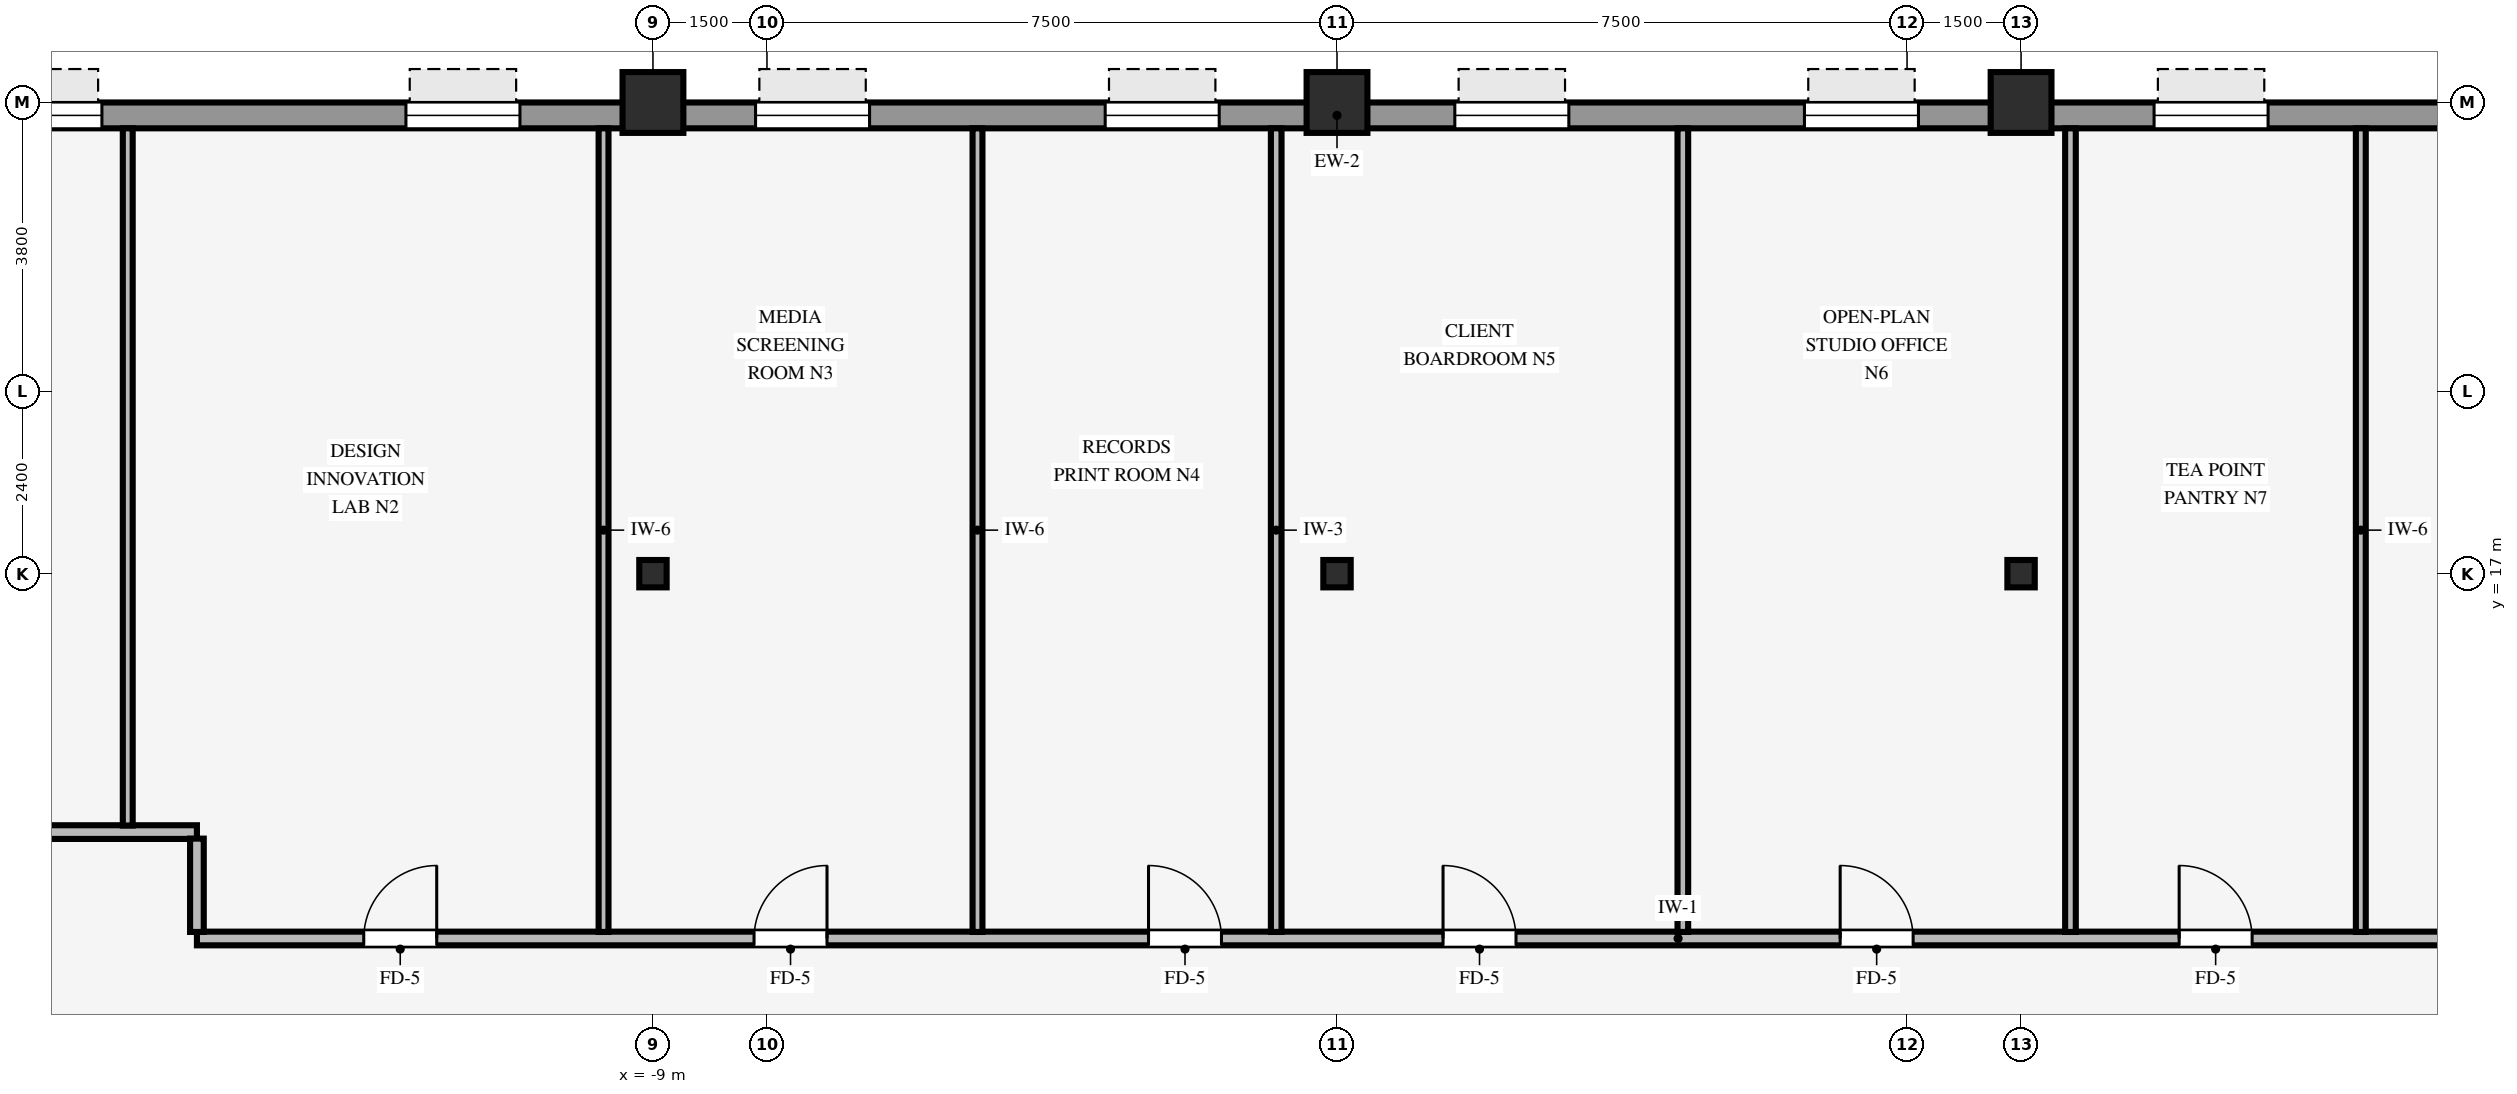
"""IFC4 building model, lengths in metres.
Left out: names, types, materials, properties, quantities, classifications, styles, units other than length and angle.
Written with IfcOpenShell. Run it as: python <this file> out.ifc"""

import sys

from ifc_helpers import new_model, si_unit, direction, frame, frame_2d, origin, origin_2d, place, context, subcontext, project, spatial, rectangle, hollow_rectangle, i_section, extrude, source, transform, mapped, element, fill, save


model = new_model("IFC4")
c1 = context("Model", 3, precision=1e-05, world=origin(), true_north=direction((0.0, 1.0)))
c2 = subcontext(c1, "Body", "Model", "MODEL_VIEW")
j1 = project(units=[si_unit("LENGTHUNIT", "METRE"), si_unit("PLANEANGLEUNIT", "RADIAN")], contexts=[c1])
p1 = place(None, origin())
s1 = spatial("IfcSite", under=j1, at=p1, CompositionType="ELEMENT")
p2 = place(p1, origin())
s2 = spatial("IfcBuilding", under=s1, at=p2, CompositionType="ELEMENT")
p3 = place(p2, frame((0.0, 0.0, 64.1)))
s3 = spatial("IfcBuildingStorey", under=s2, at=p3, CompositionType="ELEMENT", Elevation=64.1)
for number, where, z_axis, x_axis in (
    (1, (-9.0, 23.2, 0.0), (0.0, 0.0, 1.0), (1.0, 0.0, 0.0)),
    (2, (0.0, 23.2, 0.0), (0.0, 0.0, 1.0), (1.0, 0.0, 0.0)),
    (3, (9.0, 23.2, 0.0), (0.0, 0.0, 1.0), (1.0, 0.0, 0.0)),
):
    element("IfcColumn", number, at=place(p3, frame(where, z_axis=z_axis, x_axis=x_axis)), inside=s3, PredefinedType="COLUMN", context=c2, shape_type="SweptSolid", body=[
        extrude(hollow_rectangle(XDim=0.8, YDim=0.8, WallThickness=0.055, InnerFilletRadius=0.055, OuterFilletRadius=0.11, at=origin_2d()), origin(), (0.0, 0.0, 1.0), 3.37),
    ])
for number, where, z_axis, x_axis in (
    (4, (0.0, 17.0, 0.0), (0.0, 0.0, 1.0), (1.0, 0.0, 0.0)),
    (5, (-9.0, 17.0, 0.0), (0.0, 0.0, 1.0), (1.0, 0.0, 0.0)),
    (6, (9.0, 17.0, 0.0), (0.0, 0.0, 1.0), (1.0, 0.0, 0.0)),
):
    element("IfcColumn", number, at=place(p3, frame(where, z_axis=z_axis, x_axis=x_axis)), inside=s3, PredefinedType="COLUMN", context=c2, shape_type="SweptSolid", body=[
        extrude(i_section(OverallWidth=0.36, OverallDepth=0.36, WebThickness=0.021, FlangeThickness=0.021, FilletRadius=0.018, at=origin_2d()), origin(), (0.0, 0.0, 1.0), 3.37),
    ])
p4 = place(p3, frame((-19.4, 23.03, 0.0), z_axis=(0.0, 0.0, 1.0), x_axis=(1.0, 0.0, 0.0)))
e7 = element("IfcWall", 7, at=p4, inside=s3, PredefinedType="STANDARD", context=c2, shape_type="SweptSolid", body=[
    extrude(rectangle(XDim=38.8, YDim=0.34, at=frame_2d((19.4, 0.0))), origin(), (0.0, 0.0, 1.0), 2.705),
])
p5 = place(p4, frame((1.65, 0.0, 0.8)))
e8 = element("IfcOpeningElement", 8, at=p5, cuts=e7, PredefinedType="OPENING", context=c2, shape_type="SweptSolid", body=[
    extrude(rectangle(XDim=1.5, YDim=1.6, at=frame_2d((0.75, 0.8))), frame((0.0, 0.18, 0.0), z_axis=(0.0, -1.0, 0.0), x_axis=(1.0, 0.0, 0.0)), (0.0, 0.0, 1.0), 0.36),
])
p6 = place(p4, frame((7.15, 0.0, 0.8)))
e9 = element("IfcOpeningElement", 9, at=p6, cuts=e7, PredefinedType="OPENING", context=c2, shape_type="SweptSolid", body=[
    extrude(rectangle(XDim=1.5, YDim=1.6, at=frame_2d((0.75, 0.8))), frame((0.0, 0.18, 0.0), z_axis=(0.0, -1.0, 0.0), x_axis=(1.0, 0.0, 0.0)), (0.0, 0.0, 1.0), 0.36),
])
p7 = place(p4, frame((11.75, 0.0, 0.8)))
e10 = element("IfcOpeningElement", 10, at=p7, cuts=e7, PredefinedType="OPENING", context=c2, shape_type="SweptSolid", body=[
    extrude(rectangle(XDim=1.5, YDim=1.6, at=frame_2d((0.75, 0.8))), frame((0.0, 0.18, 0.0), z_axis=(0.0, -1.0, 0.0), x_axis=(1.0, 0.0, 0.0)), (0.0, 0.0, 1.0), 0.36),
])
p8 = place(p4, frame((16.35, 0.0, 0.8)))
e11 = element("IfcOpeningElement", 11, at=p8, cuts=e7, PredefinedType="OPENING", context=c2, shape_type="SweptSolid", body=[
    extrude(rectangle(XDim=1.5, YDim=1.6, at=frame_2d((0.75, 0.8))), frame((0.0, 0.18, 0.0), z_axis=(0.0, -1.0, 0.0), x_axis=(1.0, 0.0, 0.0)), (0.0, 0.0, 1.0), 0.36),
])
p9 = place(p4, frame((20.95, 0.0, 0.8)))
e12 = element("IfcOpeningElement", 12, at=p9, cuts=e7, PredefinedType="OPENING", context=c2, shape_type="SweptSolid", body=[
    extrude(rectangle(XDim=1.5, YDim=1.6, at=frame_2d((0.75, 0.8))), frame((0.0, 0.18, 0.0), z_axis=(0.0, -1.0, 0.0), x_axis=(1.0, 0.0, 0.0)), (0.0, 0.0, 1.0), 0.36),
])
p10 = place(p4, frame((25.55, 0.0, 0.8)))
e13 = element("IfcOpeningElement", 13, at=p10, cuts=e7, PredefinedType="OPENING", context=c2, shape_type="SweptSolid", body=[
    extrude(rectangle(XDim=1.5, YDim=1.6, at=frame_2d((0.75, 0.8))), frame((0.0, 0.18, 0.0), z_axis=(0.0, -1.0, 0.0), x_axis=(1.0, 0.0, 0.0)), (0.0, 0.0, 1.0), 0.36),
])
p11 = place(p4, frame((30.15, 0.0, 0.8)))
e14 = element("IfcOpeningElement", 14, at=p11, cuts=e7, PredefinedType="OPENING", context=c2, shape_type="SweptSolid", body=[
    extrude(rectangle(XDim=1.5, YDim=1.6, at=frame_2d((0.75, 0.8))), frame((0.0, 0.18, 0.0), z_axis=(0.0, -1.0, 0.0), x_axis=(1.0, 0.0, 0.0)), (0.0, 0.0, 1.0), 0.36),
])
p12 = place(p4, frame((34.75, 0.0, 0.8)))
e15 = element("IfcOpeningElement", 15, at=p12, cuts=e7, PredefinedType="OPENING", context=c2, shape_type="SweptSolid", body=[
    extrude(rectangle(XDim=1.5, YDim=1.6, at=frame_2d((0.75, 0.8))), frame((0.0, 0.18, 0.0), z_axis=(0.0, -1.0, 0.0), x_axis=(1.0, 0.0, 0.0)), (0.0, 0.0, 1.0), 0.36),
])
p13 = place(p3, frame((-15.0, 12.2, 0.0), z_axis=(0.0, 0.0, 1.0), x_axis=(1.0, 0.0, 0.0)))
e16 = element("IfcWall", 16, at=p13, inside=s3, PredefinedType="PARTITIONING", context=c2, shape_type="SweptSolid", body=[
    extrude(rectangle(XDim=30.0, YDim=0.18, at=frame_2d((15.0, 0.0))), origin(), (0.0, 0.0, 1.0), 3.36),
])
p14 = place(p13, frame((2.195, 0.0, 0.0)))
e17 = element("IfcOpeningElement", 17, at=p14, cuts=e16, PredefinedType="OPENING", context=c2, shape_type="SweptSolid", body=[
    extrude(rectangle(XDim=0.96, YDim=2.1, at=frame_2d((0.48, 1.05))), frame((0.0, 0.1, 0.0), z_axis=(0.0, -1.0, 0.0), x_axis=(1.0, 0.0, 0.0)), (0.0, 0.0, 1.0), 0.2),
])
p15 = place(p13, frame((16.395, 0.0, 0.0)))
e18 = element("IfcOpeningElement", 18, at=p15, cuts=e16, PredefinedType="OPENING", context=c2, shape_type="SweptSolid", body=[
    extrude(rectangle(XDim=0.96, YDim=2.1, at=frame_2d((0.48, 1.05))), frame((0.0, 0.1, 0.0), z_axis=(0.0, -1.0, 0.0), x_axis=(1.0, 0.0, 0.0)), (0.0, 0.0, 1.0), 0.2),
])
p16 = place(p13, frame((21.62, 0.0, 0.0)))
e19 = element("IfcOpeningElement", 19, at=p16, cuts=e16, PredefinedType="OPENING", context=c2, shape_type="SweptSolid", body=[
    extrude(rectangle(XDim=0.96, YDim=2.1, at=frame_2d((0.48, 1.05))), frame((0.0, 0.1, 0.0), z_axis=(0.0, -1.0, 0.0), x_axis=(1.0, 0.0, 0.0)), (0.0, 0.0, 1.0), 0.2),
])
p17 = place(p13, frame((7.33, 0.0, 0.0)))
e20 = element("IfcOpeningElement", 20, at=p17, cuts=e16, PredefinedType="OPENING", context=c2, shape_type="SweptSolid", body=[
    extrude(rectangle(XDim=0.96, YDim=2.1, at=frame_2d((0.48, 1.05))), frame((0.0, 0.1, 0.0), z_axis=(0.0, -1.0, 0.0), x_axis=(1.0, 0.0, 0.0)), (0.0, 0.0, 1.0), 0.2),
])
p18 = place(p13, frame((26.08, 0.0, 0.0)))
e21 = element("IfcOpeningElement", 21, at=p18, cuts=e16, PredefinedType="OPENING", context=c2, shape_type="SweptSolid", body=[
    extrude(rectangle(XDim=0.96, YDim=2.1, at=frame_2d((0.48, 1.05))), frame((0.0, 0.1, 0.0), z_axis=(0.0, -1.0, 0.0), x_axis=(1.0, 0.0, 0.0)), (0.0, 0.0, 1.0), 0.2),
])
p19 = place(p13, frame((12.52, 0.0, 0.0)))
e22 = element("IfcOpeningElement", 22, at=p19, cuts=e16, PredefinedType="OPENING", context=c2, shape_type="SweptSolid", body=[
    extrude(rectangle(XDim=0.96, YDim=2.1, at=frame_2d((0.48, 1.05))), frame((0.0, 0.1, 0.0), z_axis=(0.0, -1.0, 0.0), x_axis=(1.0, 0.0, 0.0)), (0.0, 0.0, 1.0), 0.2),
])
p20 = place(p3, frame((-20.5, 13.6, 0.0), z_axis=(0.0, 0.0, 1.0), x_axis=(1.0, 0.0, 0.0)))
e23 = element("IfcWall", 23, at=p20, inside=s3, PredefinedType="PARTITIONING", context=c2, shape_type="SweptSolid", body=[
    extrude(rectangle(XDim=5.5, YDim=0.18, at=frame_2d((2.75, 0.0))), origin(), (0.0, 0.0, 1.0), 2.942),
])
p21 = place(p20, frame((1.815, 0.0, 0.0)))
e24 = element("IfcOpeningElement", 24, at=p21, cuts=e23, PredefinedType="OPENING", context=c2, shape_type="SweptSolid", body=[
    extrude(rectangle(XDim=0.96, YDim=2.1, at=frame_2d((0.48, 1.05))), frame((0.0, 0.1, 0.0), z_axis=(0.0, -1.0, 0.0), x_axis=(1.0, 0.0, 0.0)), (0.0, 0.0, 1.0), 0.2),
])
p22 = place(p3, frame((-15.91, 13.686, 0.0), z_axis=(0.0, 0.0, 1.0), x_axis=(0.0, 1.0, 0.0)))
e25 = element("IfcWall", 25, at=p22, inside=s3, PredefinedType="PARTITIONING", context=c2, shape_type="SweptSolid", body=[
    extrude(rectangle(XDim=9.174, YDim=0.13, at=frame_2d((4.587, 0.0))), origin(), (0.0, 0.0, 1.0), 3.36),
])
p23 = place(p3, frame((-15.0, 12.286, 0.0), z_axis=(0.0, 0.0, 1.0), x_axis=(0.0, 1.0, 0.0)))
e26 = element("IfcWall", 26, at=p23, inside=s3, PredefinedType="PARTITIONING", context=c2, shape_type="SweptSolid", body=[
    extrude(rectangle(XDim=1.228, YDim=0.18, at=frame_2d((0.614, 0.0))), origin(), (0.0, 0.0, 1.0), 3.36),
])
for number, where, z_axis, x_axis in (
    (27, (-9.65, 12.286, 0.0), (0.0, 0.0, 1.0), (0.0, 1.0, 0.0)),
    (28, (-4.73, 12.286, 0.0), (0.0, 0.0, 1.0), (0.0, 1.0, 0.0)),
):
    element("IfcWall", number, at=place(p3, frame(where, z_axis=z_axis, x_axis=x_axis)), inside=s3, PredefinedType="PARTITIONING", context=c2, shape_type="SweptSolid", body=[
        extrude(rectangle(XDim=10.574, YDim=0.13, at=frame_2d((5.287, 0.0))), origin(), (0.0, 0.0, 1.0), 3.36),
    ])
for number, where, z_axis, x_axis in (
    (29, (-0.8, 12.286, 0.0), (0.0, 0.0, 1.0), (0.0, 1.0, 0.0)),
    (30, (4.55, 12.286, 0.0), (0.0, 0.0, 1.0), (0.0, 1.0, 0.0)),
    (31, (9.65, 12.286, 0.0), (0.0, 0.0, 1.0), (0.0, 1.0, 0.0)),
):
    element("IfcWall", number, at=place(p3, frame(where, z_axis=z_axis, x_axis=x_axis)), inside=s3, PredefinedType="PARTITIONING", context=c2, shape_type="SweptSolid", body=[
        extrude(rectangle(XDim=10.574, YDim=0.14, at=frame_2d((5.287, 0.0))), origin(), (0.0, 0.0, 1.0), 3.36),
    ])
p24 = place(p3, frame((13.47, 12.286, 0.0), z_axis=(0.0, 0.0, 1.0), x_axis=(0.0, 1.0, 0.0)))
e32 = element("IfcWall", 32, at=p24, inside=s3, PredefinedType="PARTITIONING", context=c2, shape_type="SweptSolid", body=[
    extrude(rectangle(XDim=10.574, YDim=0.13, at=frame_2d((5.287, 0.0))), origin(), (0.0, 0.0, 1.0), 3.36),
])
m1 = source(origin(), c2, "Body", "SweptSolid", [
    extrude(rectangle(XDim=1.5, YDim=1.6, at=frame_2d((0.75, 0.8))), frame((0.0, 0.03, 0.0), z_axis=(0.0, -1.0, 0.0), x_axis=(1.0, 0.0, 0.0)), (0.0, 0.0, 1.0), 0.06),
])
p25 = place(p5, origin())
e33 = element("IfcWindow", 33, at=p25, inside=s3, PartitioningType="SINGLE_PANEL", PredefinedType="WINDOW", context=c2, shape_type="MappedRepresentation", body=[
    mapped(m1, transform((0.0, 0.0, 0.0), scale=1.0)),
])
fill(e8, e33)
p26 = place(p6, origin())
e34 = element("IfcWindow", 34, at=p26, inside=s3, PartitioningType="SINGLE_PANEL", PredefinedType="WINDOW", context=c2, shape_type="MappedRepresentation", body=[
    mapped(m1, transform((0.0, 0.0, 0.0), scale=1.0)),
])
fill(e9, e34)
p27 = place(p7, origin())
e35 = element("IfcWindow", 35, at=p27, inside=s3, PartitioningType="SINGLE_PANEL", PredefinedType="WINDOW", context=c2, shape_type="MappedRepresentation", body=[
    mapped(m1, transform((0.0, 0.0, 0.0), scale=1.0)),
])
fill(e10, e35)
p28 = place(p8, origin())
e36 = element("IfcWindow", 36, at=p28, inside=s3, PartitioningType="SINGLE_PANEL", PredefinedType="WINDOW", context=c2, shape_type="MappedRepresentation", body=[
    mapped(m1, transform((0.0, 0.0, 0.0), scale=1.0)),
])
fill(e11, e36)
p29 = place(p9, origin())
e37 = element("IfcWindow", 37, at=p29, inside=s3, PartitioningType="SINGLE_PANEL", PredefinedType="WINDOW", context=c2, shape_type="MappedRepresentation", body=[
    mapped(m1, transform((0.0, 0.0, 0.0), scale=1.0)),
])
fill(e12, e37)
p30 = place(p10, origin())
e38 = element("IfcWindow", 38, at=p30, inside=s3, PartitioningType="SINGLE_PANEL", PredefinedType="WINDOW", context=c2, shape_type="MappedRepresentation", body=[
    mapped(m1, transform((0.0, 0.0, 0.0), scale=1.0)),
])
fill(e13, e38)
p31 = place(p11, origin())
e39 = element("IfcWindow", 39, at=p31, inside=s3, PartitioningType="SINGLE_PANEL", PredefinedType="WINDOW", context=c2, shape_type="MappedRepresentation", body=[
    mapped(m1, transform((0.0, 0.0, 0.0), scale=1.0)),
])
fill(e14, e39)
m2 = source(origin(), c2, "Body", "SweptSolid", [
    extrude(rectangle(XDim=0.96, YDim=2.1, at=frame_2d((0.48, 1.05))), frame((0.0, 0.025, 0.0), z_axis=(0.0, -1.0, 0.0), x_axis=(1.0, 0.0, 0.0)), (0.0, 0.0, 1.0), 0.05),
])
p32 = place(p14, origin())
e40 = element("IfcDoor", 40, at=p32, inside=s3, OperationType="SINGLE_SWING_RIGHT", PredefinedType="DOOR", context=c2, shape_type="MappedRepresentation", body=[
    mapped(m2, transform((0.0, 0.0, 0.0), scale=1.0)),
])
fill(e17, e40)
p33 = place(p15, origin())
e41 = element("IfcDoor", 41, at=p33, inside=s3, OperationType="SINGLE_SWING_LEFT", PredefinedType="DOOR", context=c2, shape_type="MappedRepresentation", body=[
    mapped(m2, transform((0.0, 0.0, 0.0), scale=1.0)),
])
fill(e18, e41)
p34 = place(p16, origin())
e42 = element("IfcDoor", 42, at=p34, inside=s3, OperationType="SINGLE_SWING_LEFT", PredefinedType="DOOR", context=c2, shape_type="MappedRepresentation", body=[
    mapped(m2, transform((0.0, 0.0, 0.0), scale=1.0)),
])
fill(e19, e42)
p35 = place(p17, origin())
e43 = element("IfcDoor", 43, at=p35, inside=s3, OperationType="SINGLE_SWING_RIGHT", PredefinedType="DOOR", context=c2, shape_type="MappedRepresentation", body=[
    mapped(m2, transform((0.0, 0.0, 0.0), scale=1.0)),
])
fill(e20, e43)
p36 = place(p18, origin())
e44 = element("IfcDoor", 44, at=p36, inside=s3, OperationType="SINGLE_SWING_LEFT", PredefinedType="DOOR", context=c2, shape_type="MappedRepresentation", body=[
    mapped(m2, transform((0.0, 0.0, 0.0), scale=1.0)),
])
fill(e21, e44)
p37 = place(p19, origin())
e45 = element("IfcDoor", 45, at=p37, inside=s3, OperationType="SINGLE_SWING_LEFT", PredefinedType="DOOR", context=c2, shape_type="MappedRepresentation", body=[
    mapped(m2, transform((0.0, 0.0, 0.0), scale=1.0)),
])
fill(e22, e45)
save(model, sys.argv[1])
